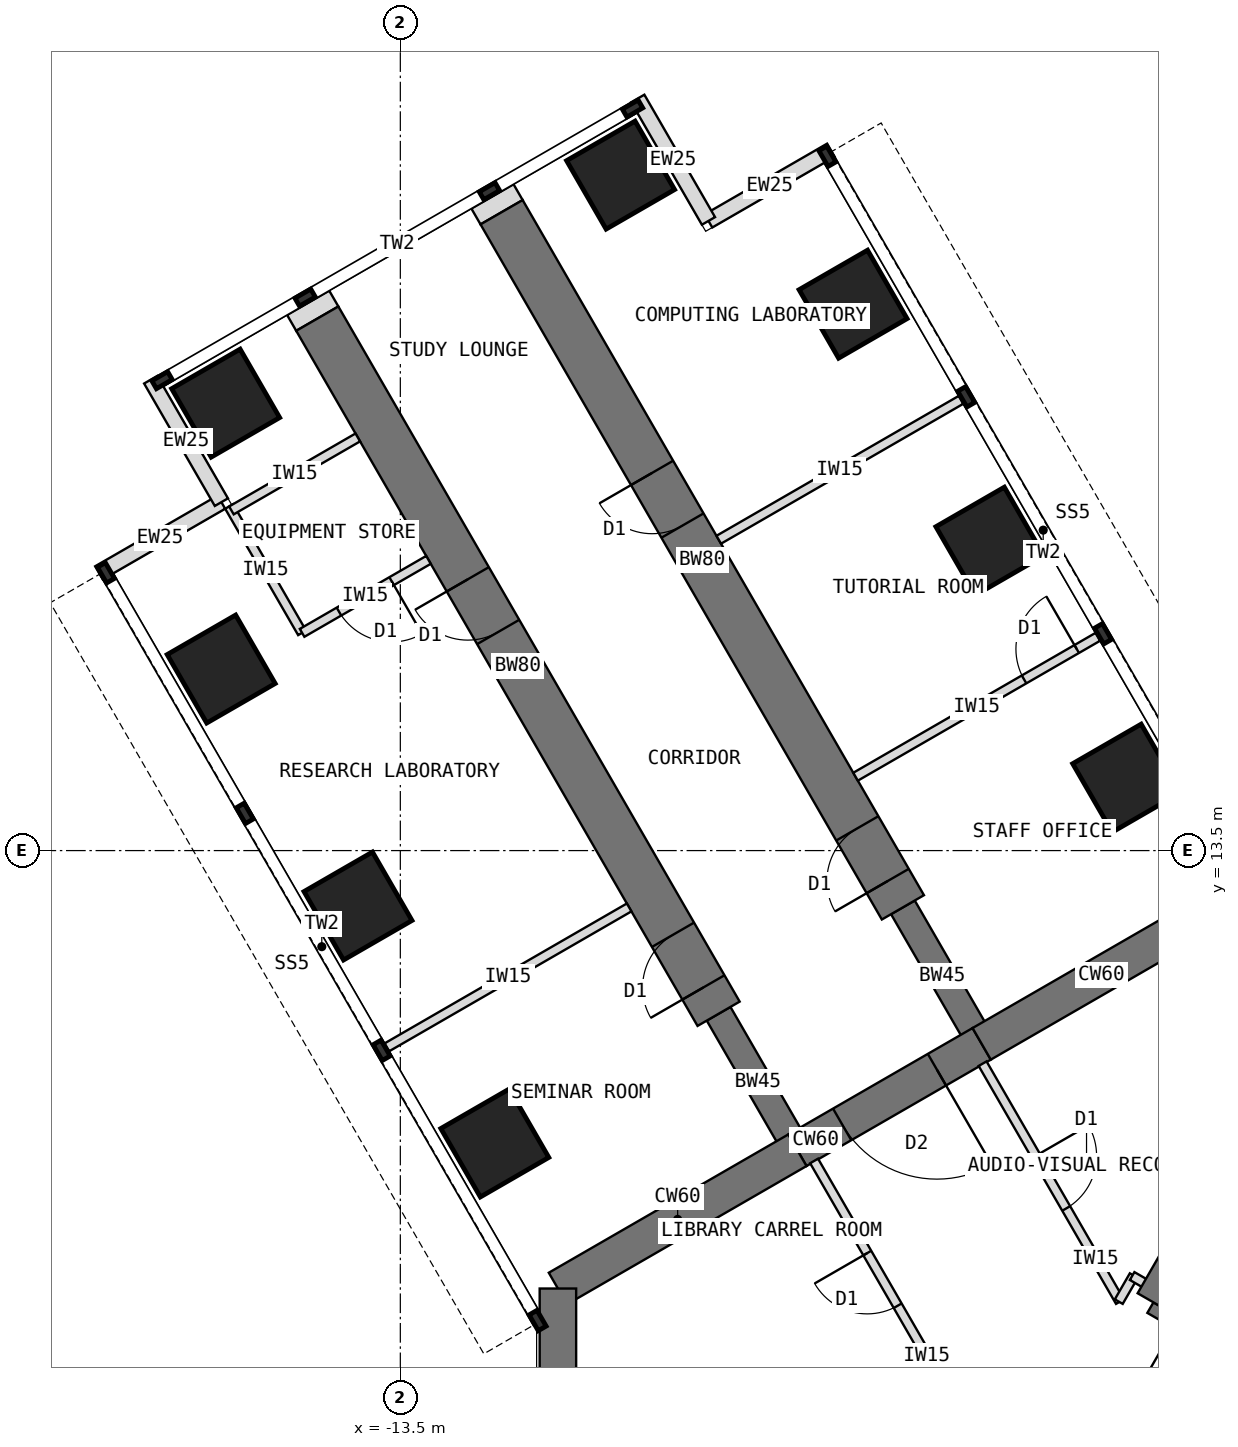
"""IFC4 building model, lengths in metres.
Left out: names, types, materials, properties, quantities, classifications, styles, units other than length and angle.
Written with IfcOpenShell. Run it as: python <this file> out.ifc"""

import sys

from ifc_helpers import new_model, si_unit, direction, frame, frame_2d, origin, origin_2d, place, context, subcontext, project, spatial, rectangle, extrude, element, fill, save


model = new_model("IFC4")
c1 = context("Model", 3, precision=1e-05, world=origin(), true_north=direction((0.0, 1.0)))
c2 = subcontext(c1, "Body", "Model", "MODEL_VIEW")
j1 = project(units=[si_unit("LENGTHUNIT", "METRE"), si_unit("PLANEANGLEUNIT", "RADIAN")], contexts=[c1])
p1 = place(None, origin())
s1 = spatial("IfcSite", under=j1, at=p1, CompositionType="ELEMENT")
p2 = place(p1, origin())
s2 = spatial("IfcBuilding", under=s1, at=p2, CompositionType="ELEMENT")
p3 = place(p2, frame((0.0, 0.0, 121.5)))
s3 = spatial("IfcBuildingStorey", under=s2, at=p3, CompositionType="ELEMENT", Elevation=121.5)
p4 = place(p3, frame((0.0, 12.596, 0.0), z_axis=(0.0, 0.0, 1.0), x_axis=(-0.866011268655, -0.500024481964, 0.0)))
e1 = element("IfcWall", 1, at=p4, inside=s3, PredefinedType="SHEAR", context=c2, shape_type="SweptSolid", body=[
    extrude(rectangle(XDim=4.548, YDim=0.6, at=frame_2d((2.274, 0.0))), origin(), (0.0, 0.0, 1.0), 4.0),
])
p5 = place(p3, frame((-3.939, 10.322, 0.0), z_axis=(0.0, 0.0, 1.0), x_axis=(-0.866019471182, -0.500010275428, 0.0)))
e2 = element("IfcWall", 2, at=p5, inside=s3, PredefinedType="SHEAR", context=c2, shape_type="SweptSolid", body=[
    extrude(rectangle(XDim=3.5, YDim=0.6, at=frame_2d((1.75, 0.0))), origin(), (0.0, 0.0, 1.0), 4.0),
])
p6 = place(p5, frame((0.85, 0.0, 0.0)))
e3 = element("IfcOpeningElement", 3, at=p6, cuts=e2, PredefinedType="OPENING", context=c2, shape_type="SweptSolid", body=[
    extrude(rectangle(XDim=1.8, YDim=2.1, at=frame_2d((0.9, 1.05))), frame((0.0, 0.31, 0.0), z_axis=(0.0, -1.0, 0.0), x_axis=(1.0, 0.0, 0.0)), (0.0, 0.0, 1.0), 0.62),
])
p7 = place(p3, frame((-6.97, 8.572, 0.0), z_axis=(0.0, 0.0, 1.0), x_axis=(-0.866034513004, -0.499984222037, 0.0)))
e4 = element("IfcWall", 4, at=p7, inside=s3, PredefinedType="SHEAR", context=c2, shape_type="SweptSolid", body=[
    extrude(rectangle(XDim=4.548, YDim=0.6, at=frame_2d((2.274, 0.0))), origin(), (0.0, 0.0, 1.0), 4.0),
])
p8 = place(p3, frame((-10.908, 6.298, 0.0), z_axis=(0.0, 0.0, 1.0), x_axis=(0.0, -1.0, 0.0)))
e5 = element("IfcWall", 5, at=p8, inside=s3, PredefinedType="SHEAR", context=c2, shape_type="SweptSolid", body=[
    extrude(rectangle(XDim=12.596, YDim=0.6, at=frame_2d((6.298, 0.0))), origin(), (0.0, 0.0, 1.0), 4.0),
])
p9 = place(p3, frame((-6.97, 8.572, 0.0), z_axis=(0.0, 0.0, 1.0), x_axis=(-0.499988811324, 0.866031863473, 0.0)))
e6 = element("IfcWall", 6, at=p9, inside=s3, PredefinedType="SHEAR", context=c2, shape_type="SweptSolid", body=[
    extrude(rectangle(XDim=2.592, YDim=0.45, at=frame_2d((1.296, 0.0))), origin(), (0.0, 0.0, 1.0), 4.0),
])
p10 = place(p3, frame((-8.266, 10.816, 0.0), z_axis=(0.0, 0.0, 1.0), x_axis=(-0.499996231654, 0.866027579429, 0.0)))
e7 = element("IfcWall", 7, at=p10, inside=s3, PredefinedType="SHEAR", context=c2, shape_type="SweptSolid", body=[
    extrude(rectangle(XDim=13.2, YDim=0.8, at=frame_2d((6.6, 0.0))), origin(), (0.0, 0.0, 1.0), 4.0),
])
p11 = place(p10, frame((0.5, 0.0, 0.0)))
e8 = element("IfcOpeningElement", 8, at=p11, cuts=e7, PredefinedType="OPENING", context=c2, shape_type="SweptSolid", body=[
    extrude(rectangle(XDim=1.0, YDim=2.1, at=frame_2d((0.5, 1.05))), frame((0.0, 0.41, 0.0), z_axis=(0.0, -1.0, 0.0), x_axis=(1.0, 0.0, 0.0)), (0.0, 0.0, 1.0), 0.82),
])
p12 = place(p10, frame((7.25, 0.0, 0.0)))
e9 = element("IfcOpeningElement", 9, at=p12, cuts=e7, PredefinedType="OPENING", context=c2, shape_type="SweptSolid", body=[
    extrude(rectangle(XDim=1.0, YDim=2.1, at=frame_2d((0.5, 1.05))), frame((0.0, 0.41, 0.0), z_axis=(0.0, -1.0, 0.0), x_axis=(1.0, 0.0, 0.0)), (0.0, 0.0, 1.0), 0.82),
])
p13 = place(p3, frame((-3.939, 10.322, 0.0), z_axis=(0.0, 0.0, 1.0), x_axis=(-0.499918158782, 0.866072649678, 0.0)))
e10 = element("IfcWall", 10, at=p13, inside=s3, PredefinedType="SHEAR", context=c2, shape_type="SweptSolid", body=[
    extrude(rectangle(XDim=2.592, YDim=0.45, at=frame_2d((1.296, 0.0))), origin(), (0.0, 0.0, 1.0), 4.0),
])
p14 = place(p3, frame((-5.234, 12.566, 0.0), z_axis=(0.0, 0.0, 1.0), x_axis=(-0.500010103361, 0.866019570528, 0.0)))
e11 = element("IfcWall", 11, at=p14, inside=s3, PredefinedType="SHEAR", context=c2, shape_type="SweptSolid", body=[
    extrude(rectangle(XDim=13.2, YDim=0.8, at=frame_2d((6.6, 0.0))), origin(), (0.0, 0.0, 1.0), 4.0),
])
p15 = place(p14, frame((0.5, 0.0, 0.0)))
e12 = element("IfcOpeningElement", 12, at=p15, cuts=e11, PredefinedType="OPENING", context=c2, shape_type="SweptSolid", body=[
    extrude(rectangle(XDim=1.0, YDim=2.1, at=frame_2d((0.5, 1.05))), frame((0.0, 0.41, 0.0), z_axis=(0.0, -1.0, 0.0), x_axis=(1.0, 0.0, 0.0)), (0.0, 0.0, 1.0), 0.82),
])
p16 = place(p14, frame((7.25, 0.0, 0.0)))
e13 = element("IfcOpeningElement", 13, at=p16, cuts=e11, PredefinedType="OPENING", context=c2, shape_type="SweptSolid", body=[
    extrude(rectangle(XDim=1.0, YDim=2.1, at=frame_2d((0.5, 1.05))), frame((0.0, 0.41, 0.0), z_axis=(0.0, -1.0, 0.0), x_axis=(1.0, 0.0, 0.0)), (0.0, 0.0, 1.0), 0.82),
])
for number, where, z_axis, x_axis in (
    (14, (-11.946, 8.691, 0.0), (0.0, 0.0, 1.0), (0.866, 0.5, 0.0)),
    (15, (-1.554, 14.691, 0.0), (0.0, 0.0, 1.0), (0.866, 0.5, 0.0)),
    (16, (-14.196, 12.588, 0.0), (0.0, 0.0, 1.0), (0.866, 0.5, 0.0)),
    (17, (-3.804, 18.588, 0.0), (0.0, 0.0, 1.0), (0.866, 0.5, 0.0)),
    (18, (-16.446, 16.486, 0.0), (0.0, 0.0, 1.0), (0.866, 0.5, 0.0)),
    (19, (-6.054, 22.486, 0.0), (0.0, 0.0, 1.0), (0.866, 0.5, 0.0)),
    (20, (-16.373, 20.858, 0.0), (0.0, 0.0, 1.0), (0.866, 0.5, 0.0)),
    (21, (-9.877, 24.608, 0.0), (0.0, 0.0, 1.0), (0.866, 0.5, 0.0)),
):
    element("IfcColumn", number, at=place(p3, frame(where, z_axis=z_axis, x_axis=x_axis)), inside=s3, PredefinedType="COLUMN", context=c2, shape_type="SweptSolid", body=[
        extrude(rectangle(XDim=1.3, YDim=1.3, at=origin_2d()), origin(), (0.0, 0.0, 1.0), 4.0),
    ])
for number, where, z_axis, x_axis in (
    (22, (-18.456, 18.067, 0.0), (0.0, 0.0, 1.0), (0.866, 0.5, 0.0)),
    (23, (-16.443, 19.23, 0.0), (0.0, 0.0, 1.0), (-0.5, 0.866, 0.0)),
    (24, (-6.419, 25.017, 0.0), (0.0, 0.0, 1.0), (-0.866, -0.5, 0.0)),
    (25, (-8.432, 23.855, 0.0), (0.0, 0.0, 1.0), (-0.5, 0.866, 0.0)),
):
    element("IfcWall", number, at=place(p3, frame(where, z_axis=z_axis, x_axis=x_axis)), inside=s3, PredefinedType="STANDARD", context=c2, shape_type="SweptSolid", body=[
        extrude(rectangle(XDim=2.325, YDim=0.25, at=frame_2d((1.163, 0.0))), origin(), (0.0, 0.0, 1.0), 3.8),
    ])
p17 = place(p3, frame((-14.865, 22.248, 0.0), z_axis=(0.0, 0.0, 1.0), x_axis=(-0.500426713919, 0.865778900179, 0.0)))
e26 = element("IfcWall", 26, at=p17, inside=s3, PredefinedType="PARTITIONING", context=c2, shape_type="SweptSolid", body=[
    extrude(rectangle(XDim=0.3, YDim=0.8, at=frame_2d((0.15, 0.0))), origin(), (0.0, 0.0, 1.0), 3.8),
])
p18 = place(p3, frame((-11.834, 23.998, 0.0), z_axis=(0.0, 0.0, 1.0), x_axis=(-0.499816412211, 0.866131372301, 0.0)))
e27 = element("IfcWall", 27, at=p18, inside=s3, PredefinedType="PARTITIONING", context=c2, shape_type="SweptSolid", body=[
    extrude(rectangle(XDim=0.3, YDim=0.8, at=frame_2d((0.15, 0.0))), origin(), (0.0, 0.0, 1.0), 3.8),
])
p19 = place(p3, frame((5.764, 1.984, 0.0), z_axis=(0.0, 0.0, 1.0), x_axis=(-0.866026010844, 0.49999894854, 0.0)))
e28 = element("IfcWall", 28, at=p19, inside=s3, PredefinedType="SHEAR", context=c2, shape_type="SweptSolid", body=[
    extrude(rectangle(XDim=8.0, YDim=0.2, at=frame_2d((4.0, 0.0))), origin(), (0.0, 0.0, 1.0), 4.0),
])
p20 = place(p19, frame((6.3, 0.0, 0.0)))
e29 = element("IfcOpeningElement", 29, at=p20, cuts=e28, PredefinedType="OPENING", context=c2, shape_type="SweptSolid", body=[
    extrude(rectangle(XDim=1.2, YDim=2.1, at=frame_2d((0.6, 1.05))), frame((0.0, 0.11, 0.0), z_axis=(0.0, -1.0, 0.0), x_axis=(1.0, 0.0, 0.0)), (0.0, 0.0, 1.0), 0.22),
])
p21 = place(p3, frame((-1.201, 6.12, 0.0), z_axis=(0.0, 0.0, 1.0), x_axis=(0.49999668571, 0.866027317282, 0.0)))
e30 = element("IfcWall", 30, at=p21, inside=s3, PredefinedType="SHEAR", context=c2, shape_type="SweptSolid", body=[
    extrude(rectangle(XDim=5.908, YDim=0.4, at=frame_2d((2.954, 0.0))), origin(), (0.0, 0.0, 1.0), 4.0),
])
p22 = place(p3, frame((-9.737, 12.565, 0.0), z_axis=(0.0, 0.0, 1.0), x_axis=(-0.866016770315, -0.500014953309, 0.0)))
e31 = element("IfcWall", 31, at=p22, inside=s3, PredefinedType="PARTITIONING", context=c2, shape_type="SweptSolid", body=[
    extrude(rectangle(XDim=4.6, YDim=0.15, at=frame_2d((2.3, 0.0))), origin(), (0.0, 0.0, 1.0), 3.8),
])
p23 = place(p3, frame((-15.115, 17.081, 0.0), z_axis=(0.0, 0.0, 1.0), x_axis=(-0.499957262057, 0.866050077142, 0.0)))
e32 = element("IfcWall", 32, at=p23, inside=s3, PredefinedType="PARTITIONING", context=c2, shape_type="SweptSolid", body=[
    extrude(rectangle(XDim=2.4, YDim=0.15, at=frame_2d((1.2, 0.0))), origin(), (0.0, 0.0, 1.0), 3.8),
])
p24 = place(p3, frame((-13.037, 18.281, 0.0), z_axis=(0.0, 0.0, 1.0), x_axis=(-0.866006032174, -0.500033551112, 0.0)))
e33 = element("IfcWall", 33, at=p24, inside=s3, PredefinedType="PARTITIONING", context=c2, shape_type="SweptSolid", body=[
    extrude(rectangle(XDim=2.4, YDim=0.15, at=frame_2d((1.2, 0.0))), origin(), (0.0, 0.0, 1.0), 3.8),
])
p25 = place(p24, frame((0.7, 0.0, 0.0)))
e34 = element("IfcOpeningElement", 34, at=p25, cuts=e33, PredefinedType="OPENING", context=c2, shape_type="SweptSolid", body=[
    extrude(rectangle(XDim=1.0, YDim=2.1, at=frame_2d((0.5, 1.05))), frame((0.0, 0.085, 0.0), z_axis=(0.0, -1.0, 0.0), x_axis=(1.0, 0.0, 0.0)), (0.0, 0.0, 1.0), 0.17),
])
p26 = place(p3, frame((-14.199, 20.294, 0.0), z_axis=(0.0, 0.0, 1.0), x_axis=(-0.866024647952, -0.500001309137, 0.0)))
e35 = element("IfcWall", 35, at=p26, inside=s3, PredefinedType="PARTITIONING", context=c2, shape_type="SweptSolid", body=[
    extrude(rectangle(XDim=2.4, YDim=0.15, at=frame_2d((1.2, 0.0))), origin(), (0.0, 0.0, 1.0), 3.8),
])
p27 = place(p3, frame((-6.013, 14.715, 0.0), z_axis=(0.0, 0.0, 1.0), x_axis=(0.866016770315, 0.500014953309, 0.0)))
e36 = element("IfcWall", 36, at=p27, inside=s3, PredefinedType="PARTITIONING", context=c2, shape_type="SweptSolid", body=[
    extrude(rectangle(XDim=4.6, YDim=0.15, at=frame_2d((2.3, 0.0))), origin(), (0.0, 0.0, 1.0), 3.8),
])
p28 = place(p27, frame((3.2, 0.0, 0.0)))
e37 = element("IfcOpeningElement", 37, at=p28, cuts=e36, PredefinedType="OPENING", context=c2, shape_type="SweptSolid", body=[
    extrude(rectangle(XDim=1.0, YDim=2.1, at=frame_2d((0.5, 1.05))), frame((0.0, 0.085, 0.0), z_axis=(0.0, -1.0, 0.0), x_axis=(1.0, 0.0, 0.0)), (0.0, 0.0, 1.0), 0.17),
])
p29 = place(p3, frame((-8.263, 18.612, 0.0), z_axis=(0.0, 0.0, 1.0), x_axis=(0.866016770315, 0.500014953309, 0.0)))
e38 = element("IfcWall", 38, at=p29, inside=s3, PredefinedType="PARTITIONING", context=c2, shape_type="SweptSolid", body=[
    extrude(rectangle(XDim=4.6, YDim=0.15, at=frame_2d((2.3, 0.0))), origin(), (0.0, 0.0, 1.0), 3.8),
])
p30 = place(p3, frame((-4.436, 4.483, 0.0), z_axis=(0.0, 0.0, 1.0), x_axis=(-0.500009315796, 0.86602002524, 0.0)))
e39 = element("IfcWall", 39, at=p30, inside=s3, PredefinedType="PARTITIONING", context=c2, shape_type="SweptSolid", body=[
    extrude(rectangle(XDim=4.519, YDim=0.15, at=frame_2d((2.259, 0.0))), origin(), (0.0, 0.0, 1.0), 3.8),
])
p31 = place(p30, frame((1.769, 0.0, 0.0)))
e40 = element("IfcOpeningElement", 40, at=p31, cuts=e39, PredefinedType="OPENING", context=c2, shape_type="SweptSolid", body=[
    extrude(rectangle(XDim=1.0, YDim=2.1, at=frame_2d((0.5, 1.05))), frame((0.0, 0.085, 0.0), z_axis=(0.0, -1.0, 0.0), x_axis=(1.0, 0.0, 0.0)), (0.0, 0.0, 1.0), 0.17),
])
p32 = place(p3, frame((-3.924, 9.996, 0.0), z_axis=(0.0, 0.0, 1.0), x_axis=(0.500032713409, -0.866006515865, 0.0)))
e41 = element("IfcWall", 41, at=p32, inside=s3, PredefinedType="PARTITIONING", context=c2, shape_type="SweptSolid", body=[
    extrude(rectangle(XDim=4.518, YDim=0.15, at=frame_2d((2.259, 0.0))), origin(), (0.0, 0.0, 1.0), 3.8),
])
p33 = place(p32, frame((1.749, 0.0, 0.0)))
e42 = element("IfcOpeningElement", 42, at=p33, cuts=e41, PredefinedType="OPENING", context=c2, shape_type="SweptSolid", body=[
    extrude(rectangle(XDim=1.0, YDim=2.1, at=frame_2d((0.5, 1.05))), frame((0.0, 0.085, 0.0), z_axis=(0.0, -1.0, 0.0), x_axis=(1.0, 0.0, 0.0)), (0.0, 0.0, 1.0), 0.17),
])
p34 = place(p3, frame((-1.684, 6.083, 0.0), z_axis=(0.0, 0.0, 1.0), x_axis=(0.50033519877, 0.865831790172, 0.0)))
e43 = element("IfcWall", 43, at=p34, inside=s3, PredefinedType="PARTITIONING", context=c2, shape_type="SweptSolid", body=[
    extrude(rectangle(XDim=0.494, YDim=0.15, at=frame_2d((0.247, 0.0))), origin(), (0.0, 0.0, 1.0), 3.8),
])
p35 = place(p3, frame((-1.464, 6.503, 0.0), z_axis=(0.0, 0.0, 1.0), x_axis=(0.866138304741, -0.499804398801, 0.0)))
e44 = element("IfcWall", 44, at=p35, inside=s3, PredefinedType="PARTITIONING", context=c2, shape_type="SweptSolid", body=[
    extrude(rectangle(XDim=0.43, YDim=0.15, at=frame_2d((0.215, 0.0))), origin(), (0.0, 0.0, 1.0), 3.8),
])
p36 = place(p6, origin())
e45 = element("IfcDoor", 45, at=p36, inside=s3, OperationType="DOUBLE_DOOR_DOUBLE_SWING", PredefinedType="DOOR", context=c2, shape_type="SweptSolid", body=[
    extrude(rectangle(XDim=1.72, YDim=2.06, at=frame_2d((0.9, 1.03))), frame((0.0, 0.025, 0.0), z_axis=(0.0, -1.0, 0.0), x_axis=(1.0, 0.0, 0.0)), (0.0, 0.0, 1.0), 0.05),
    extrude(rectangle(XDim=0.04, YDim=2.1, at=frame_2d((0.02, 1.05))), frame((0.0, 0.3, 0.0), z_axis=(0.0, -1.0, 0.0), x_axis=(1.0, 0.0, 0.0)), (0.0, 0.0, 1.0), 0.6),
    extrude(rectangle(XDim=0.04, YDim=2.1, at=frame_2d((1.78, 1.05))), frame((0.0, 0.3, 0.0), z_axis=(0.0, -1.0, 0.0), x_axis=(1.0, 0.0, 0.0)), (0.0, 0.0, 1.0), 0.6),
    extrude(rectangle(XDim=1.72, YDim=0.04, at=frame_2d((0.9, 2.08))), frame((0.0, 0.3, 0.0), z_axis=(0.0, -1.0, 0.0), x_axis=(1.0, 0.0, 0.0)), (0.0, 0.0, 1.0), 0.6),
])
fill(e3, e45)
p37 = place(p25, origin())
e46 = element("IfcDoor", 46, at=p37, inside=s3, OperationType="SINGLE_SWING_LEFT", PredefinedType="DOOR", context=c2, shape_type="SweptSolid", body=[
    extrude(rectangle(XDim=1.0, YDim=2.1, at=frame_2d((0.5, 1.05))), frame((0.0, 0.025, 0.0), z_axis=(0.0, -1.0, 0.0), x_axis=(1.0, 0.0, 0.0)), (0.0, 0.0, 1.0), 0.05),
])
fill(e34, e46)
p38 = place(p28, origin())
e47 = element("IfcDoor", 47, at=p38, inside=s3, OperationType="SINGLE_SWING_RIGHT", PredefinedType="DOOR", context=c2, shape_type="SweptSolid", body=[
    extrude(rectangle(XDim=1.0, YDim=2.1, at=frame_2d((0.5, 1.05))), frame((0.0, 0.025, 0.0), z_axis=(0.0, -1.0, 0.0), x_axis=(1.0, 0.0, 0.0)), (0.0, 0.0, 1.0), 0.05),
])
fill(e37, e47)
p39 = place(p33, origin())
e48 = element("IfcDoor", 48, at=p39, inside=s3, OperationType="SINGLE_SWING_LEFT", PredefinedType="DOOR", context=c2, shape_type="SweptSolid", body=[
    extrude(rectangle(XDim=1.0, YDim=2.1, at=frame_2d((0.5, 1.05))), frame((0.0, 0.025, 0.0), z_axis=(0.0, -1.0, 0.0), x_axis=(1.0, 0.0, 0.0)), (0.0, 0.0, 1.0), 0.05),
])
fill(e42, e48)
p40 = place(p31, origin())
e49 = element("IfcDoor", 49, at=p40, inside=s3, OperationType="SINGLE_SWING_RIGHT", PredefinedType="DOOR", context=c2, shape_type="SweptSolid", body=[
    extrude(rectangle(XDim=1.0, YDim=2.1, at=frame_2d((0.5, 1.05))), frame((0.0, 0.025, 0.0), z_axis=(0.0, -1.0, 0.0), x_axis=(1.0, 0.0, 0.0)), (0.0, 0.0, 1.0), 0.05),
])
fill(e40, e49)
p41 = place(p11, origin())
e50 = element("IfcDoor", 50, at=p41, inside=s3, OperationType="SINGLE_SWING_LEFT", PredefinedType="DOOR", context=c2, shape_type="SweptSolid", body=[
    extrude(rectangle(XDim=0.92, YDim=2.06, at=frame_2d((0.5, 1.03))), frame((0.0, 0.025, 0.0), z_axis=(0.0, -1.0, 0.0), x_axis=(1.0, 0.0, 0.0)), (0.0, 0.0, 1.0), 0.05),
    extrude(rectangle(XDim=0.04, YDim=2.1, at=frame_2d((0.02, 1.05))), frame((0.0, 0.4, 0.0), z_axis=(0.0, -1.0, 0.0), x_axis=(1.0, 0.0, 0.0)), (0.0, 0.0, 1.0), 0.8),
    extrude(rectangle(XDim=0.04, YDim=2.1, at=frame_2d((0.98, 1.05))), frame((0.0, 0.4, 0.0), z_axis=(0.0, -1.0, 0.0), x_axis=(1.0, 0.0, 0.0)), (0.0, 0.0, 1.0), 0.8),
    extrude(rectangle(XDim=0.92, YDim=0.04, at=frame_2d((0.5, 2.08))), frame((0.0, 0.4, 0.0), z_axis=(0.0, -1.0, 0.0), x_axis=(1.0, 0.0, 0.0)), (0.0, 0.0, 1.0), 0.8),
])
fill(e8, e50)
p42 = place(p12, origin())
e51 = element("IfcDoor", 51, at=p42, inside=s3, OperationType="SINGLE_SWING_RIGHT", PredefinedType="DOOR", context=c2, shape_type="SweptSolid", body=[
    extrude(rectangle(XDim=0.92, YDim=2.06, at=frame_2d((0.5, 1.03))), frame((0.0, 0.025, 0.0), z_axis=(0.0, -1.0, 0.0), x_axis=(1.0, 0.0, 0.0)), (0.0, 0.0, 1.0), 0.05),
    extrude(rectangle(XDim=0.04, YDim=2.1, at=frame_2d((0.02, 1.05))), frame((0.0, 0.4, 0.0), z_axis=(0.0, -1.0, 0.0), x_axis=(1.0, 0.0, 0.0)), (0.0, 0.0, 1.0), 0.8),
    extrude(rectangle(XDim=0.04, YDim=2.1, at=frame_2d((0.98, 1.05))), frame((0.0, 0.4, 0.0), z_axis=(0.0, -1.0, 0.0), x_axis=(1.0, 0.0, 0.0)), (0.0, 0.0, 1.0), 0.8),
    extrude(rectangle(XDim=0.92, YDim=0.04, at=frame_2d((0.5, 2.08))), frame((0.0, 0.4, 0.0), z_axis=(0.0, -1.0, 0.0), x_axis=(1.0, 0.0, 0.0)), (0.0, 0.0, 1.0), 0.8),
])
fill(e9, e51)
p43 = place(p15, origin())
e52 = element("IfcDoor", 52, at=p43, inside=s3, OperationType="SINGLE_SWING_LEFT", PredefinedType="DOOR", context=c2, shape_type="SweptSolid", body=[
    extrude(rectangle(XDim=0.92, YDim=2.06, at=frame_2d((0.5, 1.03))), frame((0.0, 0.025, 0.0), z_axis=(0.0, -1.0, 0.0), x_axis=(1.0, 0.0, 0.0)), (0.0, 0.0, 1.0), 0.05),
    extrude(rectangle(XDim=0.04, YDim=2.1, at=frame_2d((0.02, 1.05))), frame((0.0, 0.4, 0.0), z_axis=(0.0, -1.0, 0.0), x_axis=(1.0, 0.0, 0.0)), (0.0, 0.0, 1.0), 0.8),
    extrude(rectangle(XDim=0.04, YDim=2.1, at=frame_2d((0.98, 1.05))), frame((0.0, 0.4, 0.0), z_axis=(0.0, -1.0, 0.0), x_axis=(1.0, 0.0, 0.0)), (0.0, 0.0, 1.0), 0.8),
    extrude(rectangle(XDim=0.92, YDim=0.04, at=frame_2d((0.5, 2.08))), frame((0.0, 0.4, 0.0), z_axis=(0.0, -1.0, 0.0), x_axis=(1.0, 0.0, 0.0)), (0.0, 0.0, 1.0), 0.8),
])
fill(e12, e52)
p44 = place(p16, origin())
e53 = element("IfcDoor", 53, at=p44, inside=s3, OperationType="SINGLE_SWING_RIGHT", PredefinedType="DOOR", context=c2, shape_type="SweptSolid", body=[
    extrude(rectangle(XDim=0.92, YDim=2.06, at=frame_2d((0.5, 1.03))), frame((0.0, 0.025, 0.0), z_axis=(0.0, -1.0, 0.0), x_axis=(1.0, 0.0, 0.0)), (0.0, 0.0, 1.0), 0.05),
    extrude(rectangle(XDim=0.04, YDim=2.1, at=frame_2d((0.02, 1.05))), frame((0.0, 0.4, 0.0), z_axis=(0.0, -1.0, 0.0), x_axis=(1.0, 0.0, 0.0)), (0.0, 0.0, 1.0), 0.8),
    extrude(rectangle(XDim=0.04, YDim=2.1, at=frame_2d((0.98, 1.05))), frame((0.0, 0.4, 0.0), z_axis=(0.0, -1.0, 0.0), x_axis=(1.0, 0.0, 0.0)), (0.0, 0.0, 1.0), 0.8),
    extrude(rectangle(XDim=0.92, YDim=0.04, at=frame_2d((0.5, 2.08))), frame((0.0, 0.4, 0.0), z_axis=(0.0, -1.0, 0.0), x_axis=(1.0, 0.0, 0.0)), (0.0, 0.0, 1.0), 0.8),
])
fill(e13, e53)
save(model, sys.argv[1])
